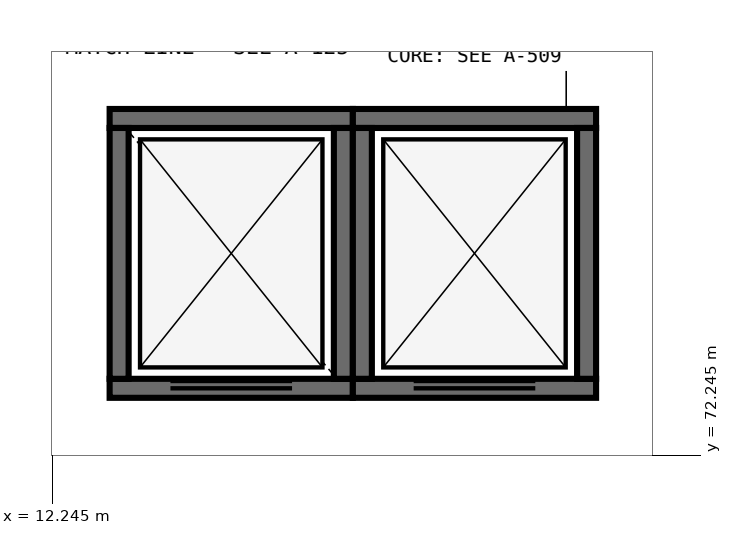
"""IFC4 building model, lengths in metres.
Left out: names, types, materials, properties, quantities, classifications, styles, units other than length and angle.
Written with IfcOpenShell. Run it as: python <this file> out.ifc"""

import sys

from ifc_helpers import new_model, si_unit, direction, frame, frame_2d, origin, place, context, subcontext, project, spatial, rectangle, extrude, element, fill, save


model = new_model("IFC4")
c1 = context("Model", 3, precision=1e-05, world=origin(), true_north=direction((0.0, 1.0)))
c2 = subcontext(c1, "Body", "Model", "MODEL_VIEW")
j1 = project(units=[si_unit("LENGTHUNIT", "METRE"), si_unit("PLANEANGLEUNIT", "RADIAN")], contexts=[c1])
p1 = place(None, origin())
s1 = spatial("IfcSite", under=j1, at=p1, CompositionType="ELEMENT")
p2 = place(p1, origin())
s2 = spatial("IfcBuilding", under=s1, at=p2, CompositionType="ELEMENT")
p3 = place(p2, frame((0.0, 0.0, 6.0)))
s3 = spatial("IfcBuildingStorey", under=s2, at=p3, CompositionType="ELEMENT", Elevation=6.0)
p4 = place(p3, frame((13.0, 73.125, 0.0), z_axis=(0.0, 0.0, 1.0), x_axis=(1.0, 0.0, 0.0)))
e1 = element("IfcWall", 1, at=p4, inside=s3, PredefinedType="SHEAR", context=c2, shape_type="SweptSolid", body=[
    extrude(rectangle(XDim=3.2, YDim=0.25, at=frame_2d((1.6, 0.0))), origin(), (0.0, 0.0, 1.0), 6.0),
])
p5 = place(p4, frame((0.8, 0.0, 0.0)))
e2 = element("IfcOpeningElement", 2, at=p5, cuts=e1, PredefinedType="OPENING", context=c2, shape_type="SweptSolid", body=[
    extrude(rectangle(XDim=1.6, YDim=2.4, at=frame_2d((0.8, 1.2))), frame((0.0, 0.14, 0.0), z_axis=(0.0, -1.0, 0.0), x_axis=(1.0, 0.0, 0.0)), (0.0, 0.0, 1.0), 0.28),
])
p6 = place(p3, frame((16.2, 76.675, 0.0), z_axis=(0.0, 0.0, 1.0), x_axis=(-1.0, 0.0, 0.0)))
e3 = element("IfcWall", 3, at=p6, inside=s3, PredefinedType="SHEAR", context=c2, shape_type="SweptSolid", body=[
    extrude(rectangle(XDim=3.2, YDim=0.25, at=frame_2d((1.6, 0.0))), origin(), (0.0, 0.0, 1.0), 6.0),
])
for number, where, z_axis, x_axis in (
    (4, (13.125, 76.55, 0.0), (0.0, 0.0, 1.0), (0.0, -1.0, 0.0)),
    (5, (16.075, 73.25, 0.0), (0.0, 0.0, 1.0), (0.0, 1.0, 0.0)),
):
    element("IfcWall", number, at=place(p3, frame(where, z_axis=z_axis, x_axis=x_axis)), inside=s3, PredefinedType="SHEAR", context=c2, shape_type="SweptSolid", body=[
        extrude(rectangle(XDim=3.3, YDim=0.25, at=frame_2d((1.65, 0.0))), origin(), (0.0, 0.0, 1.0), 6.0),
    ])
p7 = place(p3, frame((16.2, 73.125, 0.0), z_axis=(0.0, 0.0, 1.0), x_axis=(1.0, 0.0, 0.0)))
e6 = element("IfcWall", 6, at=p7, inside=s3, PredefinedType="SHEAR", context=c2, shape_type="SweptSolid", body=[
    extrude(rectangle(XDim=3.2, YDim=0.25, at=frame_2d((1.6, 0.0))), origin(), (0.0, 0.0, 1.0), 6.0),
])
p8 = place(p7, frame((0.8, 0.0, 0.0)))
e7 = element("IfcOpeningElement", 7, at=p8, cuts=e6, PredefinedType="OPENING", context=c2, shape_type="SweptSolid", body=[
    extrude(rectangle(XDim=1.6, YDim=2.4, at=frame_2d((0.8, 1.2))), frame((0.0, 0.14, 0.0), z_axis=(0.0, -1.0, 0.0), x_axis=(1.0, 0.0, 0.0)), (0.0, 0.0, 1.0), 0.28),
])
p9 = place(p3, frame((19.4, 76.675, 0.0), z_axis=(0.0, 0.0, 1.0), x_axis=(-1.0, 0.0, 0.0)))
e8 = element("IfcWall", 8, at=p9, inside=s3, PredefinedType="SHEAR", context=c2, shape_type="SweptSolid", body=[
    extrude(rectangle(XDim=3.2, YDim=0.25, at=frame_2d((1.6, 0.0))), origin(), (0.0, 0.0, 1.0), 6.0),
])
for number, where, z_axis, x_axis in (
    (9, (16.325, 76.55, 0.0), (0.0, 0.0, 1.0), (0.0, -1.0, 0.0)),
    (10, (19.275, 73.25, 0.0), (0.0, 0.0, 1.0), (0.0, 1.0, 0.0)),
):
    element("IfcWall", number, at=place(p3, frame(where, z_axis=z_axis, x_axis=x_axis)), inside=s3, PredefinedType="SHEAR", context=c2, shape_type="SweptSolid", body=[
        extrude(rectangle(XDim=3.3, YDim=0.25, at=frame_2d((1.65, 0.0))), origin(), (0.0, 0.0, 1.0), 6.0),
    ])
p10 = place(p5, origin())
e11 = element("IfcDoor", 11, at=p10, inside=s3, OperationType="DOUBLE_DOOR_SLIDING", PredefinedType="DOOR", context=c2, shape_type="SweptSolid", body=[
    extrude(rectangle(XDim=1.6, YDim=2.4, at=frame_2d((0.8, 1.2))), frame((0.0, 0.025, 0.0), z_axis=(0.0, -1.0, 0.0), x_axis=(1.0, 0.0, 0.0)), (0.0, 0.0, 1.0), 0.05),
])
fill(e2, e11)
p11 = place(p8, origin())
e12 = element("IfcDoor", 12, at=p11, inside=s3, OperationType="DOUBLE_DOOR_SLIDING", PredefinedType="DOOR", context=c2, shape_type="SweptSolid", body=[
    extrude(rectangle(XDim=1.6, YDim=2.4, at=frame_2d((0.8, 1.2))), frame((0.0, 0.025, 0.0), z_axis=(0.0, -1.0, 0.0), x_axis=(1.0, 0.0, 0.0)), (0.0, 0.0, 1.0), 0.05),
])
fill(e7, e12)
save(model, sys.argv[1])
